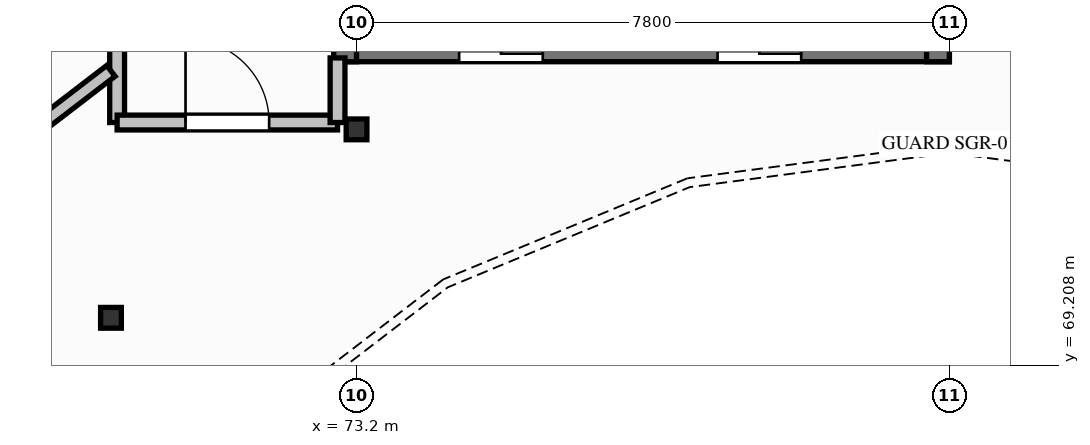
"""IFC4 building model, lengths in metres.
Left out: names, types, materials, properties, quantities, classifications, styles, units other than length and angle.
Written with IfcOpenShell. Run it as: python <this file> out.ifc"""

import sys

from ifc_helpers import new_model, si_unit, direction, frame, frame_2d, origin, origin_2d, place, context, subcontext, project, spatial, rectangle, hollow_circle, extrude, element, fill, save


model = new_model("IFC4")
c1 = context("Model", 3, precision=1e-05, world=origin(), true_north=direction((0.0, 1.0)))
c2 = subcontext(c1, "Body", "Model", "MODEL_VIEW")
j1 = project(units=[si_unit("LENGTHUNIT", "METRE"), si_unit("PLANEANGLEUNIT", "RADIAN")], contexts=[c1])
p1 = place(None, origin())
s1 = spatial("IfcSite", under=j1, at=p1, CompositionType="ELEMENT")
p2 = place(p1, origin())
s2 = spatial("IfcBuilding", under=s1, at=p2, CompositionType="ELEMENT")
p3 = place(p2, frame((0.0, 0.0, 13.2)))
s3 = spatial("IfcBuildingStorey", under=s2, at=p3, CompositionType="ELEMENT", Elevation=13.2)
p4 = place(p3, frame((72.9, 73.35, 0.0), z_axis=(0.0, 0.0, 1.0), x_axis=(1.0, 0.0, 0.0)))
e1 = element("IfcWall", 1, at=p4, inside=s3, PredefinedType="SHEAR", context=c2, shape_type="SweptSolid", body=[
    extrude(rectangle(XDim=8.1, YDim=0.3, at=frame_2d((4.05, 0.0))), origin(), (0.0, 0.0, 1.0), 4.05),
])
p5 = place(p4, frame((1.65, 0.0, 0.0)))
e2 = element("IfcOpeningElement", 2, at=p5, cuts=e1, PredefinedType="OPENING", context=c2, shape_type="SweptSolid", body=[
    extrude(rectangle(XDim=1.1, YDim=2.1, at=frame_2d((0.55, 1.05))), frame((0.0, 0.16, 0.0), z_axis=(0.0, -1.0, 0.0), x_axis=(1.0, 0.0, 0.0)), (0.0, 0.0, 1.0), 0.32),
])
p6 = place(p4, frame((5.05, 0.0, 0.0)))
e3 = element("IfcOpeningElement", 3, at=p6, cuts=e1, PredefinedType="OPENING", context=c2, shape_type="SweptSolid", body=[
    extrude(rectangle(XDim=1.1, YDim=2.1, at=frame_2d((0.55, 1.05))), frame((0.0, 0.16, 0.0), z_axis=(0.0, -1.0, 0.0), x_axis=(1.0, 0.0, 0.0)), (0.0, 0.0, 1.0), 0.32),
])
p7 = place(p3, frame((73.05, 73.2, 0.0), z_axis=(0.0, 0.0, 1.0), x_axis=(0.0, 1.0, 0.0)))
e4 = element("IfcWall", 4, at=p7, inside=s3, PredefinedType="SHEAR", context=c2, shape_type="SweptSolid", body=[
    extrude(rectangle(XDim=7.2, YDim=0.3, at=frame_2d((3.6, 0.0))), origin(), (0.0, 0.0, 1.0), 4.05),
])
p8 = place(p7, frame((4.2, 0.0, 0.0)))
e5 = element("IfcOpeningElement", 5, at=p8, cuts=e4, PredefinedType="OPENING", context=c2, shape_type="SweptSolid", body=[
    extrude(rectangle(XDim=1.1, YDim=2.15, at=frame_2d((0.55, 1.075))), frame((0.0, 0.16, 0.0), z_axis=(0.0, -1.0, 0.0), x_axis=(1.0, 0.0, 0.0)), (0.0, 0.0, 1.0), 0.32),
])
p9 = place(p3, frame((80.85, 73.2, 0.0), z_axis=(0.0, 0.0, 1.0), x_axis=(0.0, 1.0, 0.0)))
e6 = element("IfcWall", 6, at=p9, inside=s3, PredefinedType="SHEAR", context=c2, shape_type="SweptSolid", body=[
    extrude(rectangle(XDim=7.2, YDim=0.3, at=frame_2d((3.6, 0.0))), origin(), (0.0, 0.0, 1.0), 4.05),
])
for number, where, z_axis, x_axis in (
    (7, (73.2, 72.31, 0.0), (0.0, 0.0, 1.0), (1.0, 0.0, 0.0)),
    (8, (69.969, 69.831, 0.0), (0.0, 0.0, 1.0), (1.0, 0.0, 0.0)),
):
    element("IfcColumn", number, at=place(p3, frame(where, z_axis=z_axis, x_axis=x_axis)), inside=s3, PredefinedType="COLUMN", context=c2, shape_type="SweptSolid", body=[
        extrude(hollow_circle(Radius=0.136, WallThickness=0.012, at=origin_2d()), origin(), (0.0, 0.0, 1.0), 4.05),
    ])
p10 = place(p3, frame((70.05, 72.4, 0.0), z_axis=(0.0, 0.0, 1.0), x_axis=(0.0, 1.0, 0.0)))
e9 = element("IfcWall", 9, at=p10, inside=s3, PredefinedType="PARTITIONING", context=c2, shape_type="SweptSolid", body=[
    extrude(rectangle(XDim=7.95, YDim=0.195, at=frame_2d((3.975, 0.0))), origin(), (0.0, 0.0, 1.0), 3.388),
])
p11 = place(p3, frame((70.05, 72.4, 0.0), z_axis=(0.0, 0.0, 1.0), x_axis=(1.0, 0.0, 0.0)))
e10 = element("IfcWall", 10, at=p11, inside=s3, PredefinedType="PARTITIONING", context=c2, shape_type="SweptSolid", body=[
    extrude(rectangle(XDim=2.9, YDim=0.195, at=frame_2d((1.45, 0.0))), origin(), (0.0, 0.0, 1.0), 3.418),
])
p12 = place(p11, frame((0.9, 0.0, 0.0)))
e11 = element("IfcOpeningElement", 11, at=p12, cuts=e10, PredefinedType="OPENING", context=c2, shape_type="SweptSolid", body=[
    extrude(rectangle(XDim=1.1, YDim=2.15, at=frame_2d((0.55, 1.075))), frame((0.0, 0.107, 0.0), z_axis=(0.0, -1.0, 0.0), x_axis=(1.0, 0.0, 0.0)), (0.0, 0.0, 1.0), 0.215),
])
p13 = place(p3, frame((72.95, 72.4, 0.0), z_axis=(0.0, 0.0, 1.0), x_axis=(0.0, 1.0, 0.0)))
e12 = element("IfcWall", 12, at=p13, inside=s3, PredefinedType="PARTITIONING", context=c2, shape_type="SweptSolid", body=[
    extrude(rectangle(XDim=0.85, YDim=0.195, at=frame_2d((0.425, 0.0))), origin(), (0.0, 0.0, 1.0), 3.418),
])
p14 = place(p3, frame((69.969, 73.079, 0.0), z_axis=(0.0, 0.0, 1.0), x_axis=(-0.7933756116, -0.608732403374, 0.0)))
e13 = element("IfcWall", 13, at=p14, inside=s3, PredefinedType="PARTITIONING", context=c2, shape_type="SweptSolid", body=[
    extrude(rectangle(XDim=2.317, YDim=0.18, at=frame_2d((1.158, 0.0))), origin(), (0.0, 0.0, 1.0), 3.418),
])
p15 = place(p12, origin())
e14 = element("IfcDoor", 14, at=p15, inside=s3, OperationType="SINGLE_SWING_LEFT", PredefinedType="DOOR", context=c2, shape_type="SweptSolid", body=[
    extrude(rectangle(XDim=1.1, YDim=2.15, at=frame_2d((0.55, 1.075))), frame((0.0, 0.025, 0.0), z_axis=(0.0, -1.0, 0.0), x_axis=(1.0, 0.0, 0.0)), (0.0, 0.0, 1.0), 0.05),
])
fill(e11, e14)
save(model, sys.argv[1])
